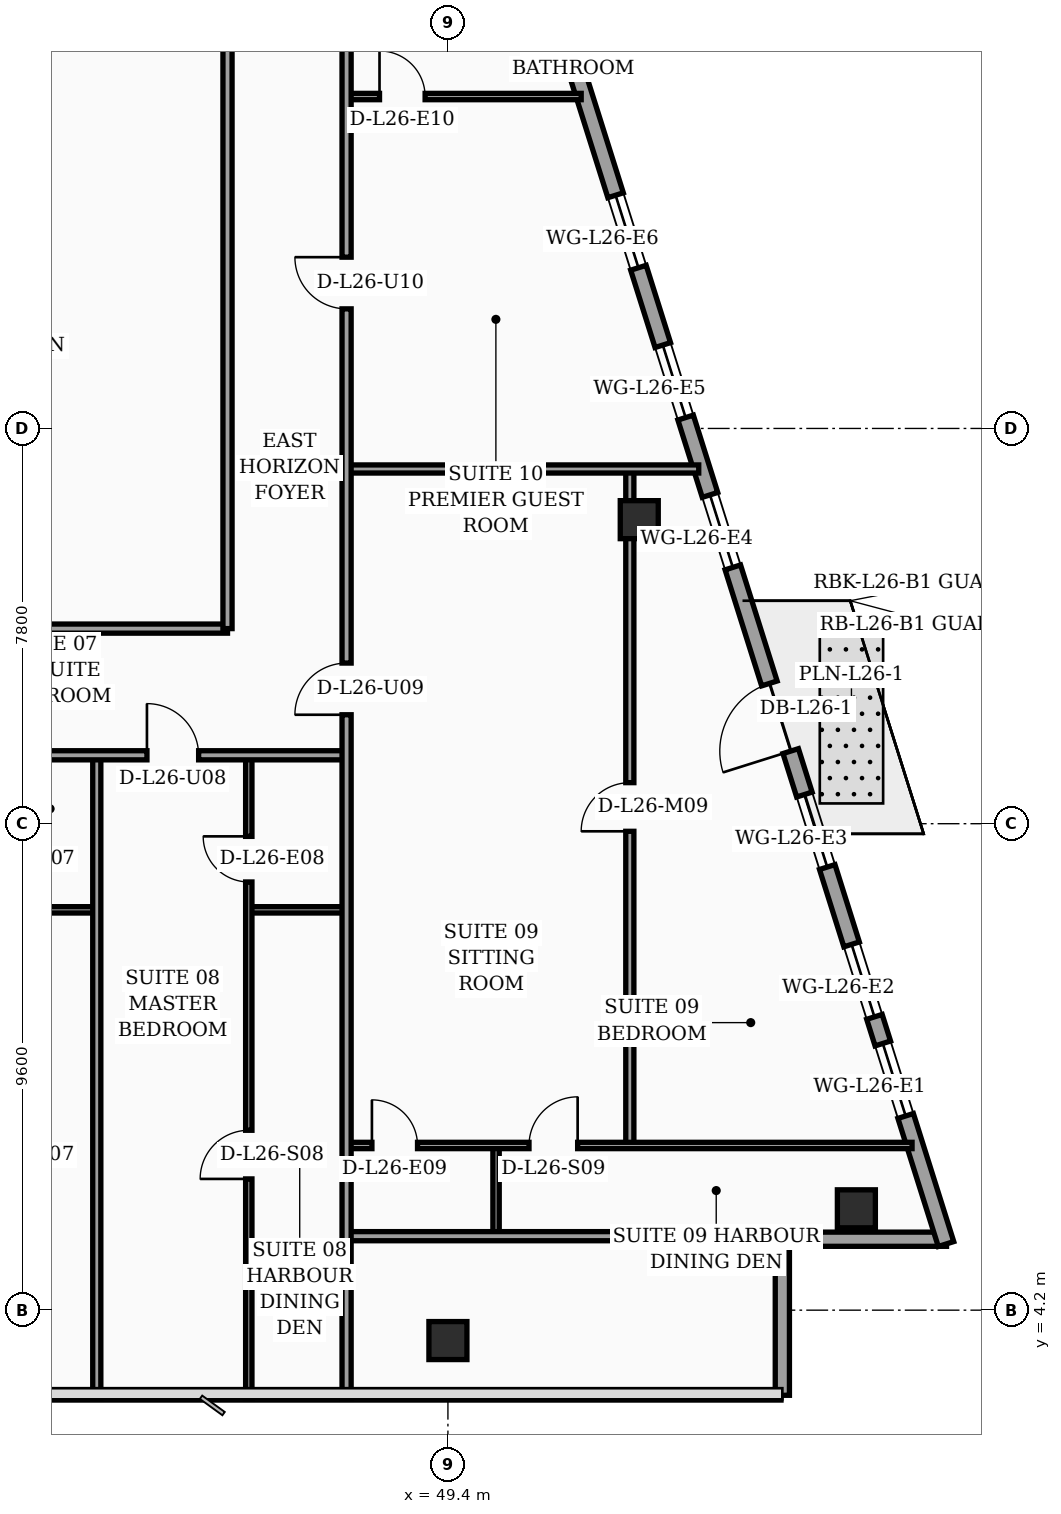
"""IFC4 building model, lengths in metres.
Left out: names, types, materials, properties, quantities, classifications, styles, units other than length and angle.
Written with IfcOpenShell. Run it as: python <this file> out.ifc"""

import sys

from ifc_helpers import new_model, si_unit, direction, frame, frame_2d, origin, origin_2d, place, context, subcontext, project, spatial, rectangle, hollow_rectangle, extrude, element, fill, save


model = new_model("IFC4")
c1 = context("Model", 3, precision=1e-05, world=origin(), true_north=direction((0.0, 1.0)))
c2 = subcontext(c1, "Body", "Model", "MODEL_VIEW")
j1 = project(units=[si_unit("LENGTHUNIT", "METRE"), si_unit("PLANEANGLEUNIT", "RADIAN")], contexts=[c1])
p1 = place(None, origin())
s1 = spatial("IfcSite", under=j1, at=p1, CompositionType="ELEMENT")
p2 = place(p1, origin())
s2 = spatial("IfcBuilding", under=s1, at=p2, CompositionType="ELEMENT")
p3 = place(p2, frame((0.0, 0.0, 108.8)))
s3 = spatial("IfcBuildingStorey", under=s2, at=p3, CompositionType="ELEMENT", Elevation=108.8)
for number, where, z_axis, x_axis in (
    (1, (49.4, 3.6, 0.0), (0.0, 0.0, 1.0), (1.0, 0.0, 0.0)),
    (2, (57.461, 6.2, 0.0), (0.0, 0.0, 1.0), (1.0, 0.0, 0.0)),
    (3, (53.176, 19.8, 0.0), (0.0, 0.0, 1.0), (1.0, 0.0, 0.0)),
):
    element("IfcColumn", number, at=place(p3, frame(where, z_axis=z_axis, x_axis=x_axis)), inside=s3, PredefinedType="COLUMN", context=c2, shape_type="SweptSolid", body=[
        extrude(hollow_rectangle(XDim=0.75, YDim=0.75, WallThickness=0.032, at=origin_2d()), origin(), (0.0, 0.0, 1.0), 3.56),
    ])
p4 = place(p3, frame((56.0, 2.52, 0.0), z_axis=(0.0, 0.0, 1.0), x_axis=(0.0, 1.0, 0.0)))
e4 = element("IfcWall", 4, at=p4, inside=s3, PredefinedType="SOLIDWALL", context=c2, shape_type="SweptSolid", body=[
    extrude(rectangle(XDim=2.94, YDim=0.28, at=frame_2d((1.47, 0.0))), origin(), (0.0, 0.0, 1.0), 3.04),
])
p5 = place(p3, frame((55.86, 5.6, 0.0), z_axis=(0.0, 0.0, 1.0), x_axis=(1.0, 0.0, 0.0)))
e5 = element("IfcWall", 5, at=p5, inside=s3, PredefinedType="SOLIDWALL", context=c2, shape_type="SweptSolid", body=[
    extrude(rectangle(XDim=3.38, YDim=0.28, at=frame_2d((1.69, 0.0))), origin(), (0.0, 0.0, 1.0), 3.04),
])
p6 = place(p3, frame((59.23, 5.505, 0.0), z_axis=(0.0, 0.0, 1.0), x_axis=(-0.300509063924, 0.953778958931, 0.0)))
e6 = element("IfcWall", 6, at=p6, inside=s3, PredefinedType="SOLIDWALL", context=c2, shape_type="SweptSolid", body=[
    extrude(rectangle(XDim=30.814, YDim=0.32, at=frame_2d((15.407, 0.0))), origin(), (0.0, 0.0, 1.0), 3.56),
])
p7 = place(p6, frame((10.199, 0.0, 0.0)))
e7 = element("IfcOpeningElement", 7, at=p7, cuts=e6, PredefinedType="OPENING", context=c2, shape_type="SweptSolid", body=[
    extrude(rectangle(XDim=1.4, YDim=2.25, at=frame_2d((0.7, 1.125))), frame((0.0, 0.17, 0.0), z_axis=(0.0, -1.0, 0.0), x_axis=(1.0, 0.0, 0.0)), (0.0, 0.0, 1.0), 0.34),
])
p8 = place(p6, frame((2.65, 0.0, 0.75)))
e8 = element("IfcOpeningElement", 8, at=p8, cuts=e6, PredefinedType="OPENING", context=c2, shape_type="SweptSolid", body=[
    extrude(rectangle(XDim=1.5, YDim=1.6, at=frame_2d((0.75, 0.8))), frame((0.0, 0.17, 0.0), z_axis=(0.0, -1.0, 0.0), x_axis=(1.0, 0.0, 0.0)), (0.0, 0.0, 1.0), 0.34),
])
p9 = place(p6, frame((4.7, 0.0, 0.75)))
e9 = element("IfcOpeningElement", 9, at=p9, cuts=e6, PredefinedType="OPENING", context=c2, shape_type="SweptSolid", body=[
    extrude(rectangle(XDim=1.5, YDim=1.6, at=frame_2d((0.75, 0.8))), frame((0.0, 0.17, 0.0), z_axis=(0.0, -1.0, 0.0), x_axis=(1.0, 0.0, 0.0)), (0.0, 0.0, 1.0), 0.34),
])
p10 = place(p6, frame((7.8, 0.0, 0.75)))
e10 = element("IfcOpeningElement", 10, at=p10, cuts=e6, PredefinedType="OPENING", context=c2, shape_type="SweptSolid", body=[
    extrude(rectangle(XDim=1.5, YDim=1.6, at=frame_2d((0.75, 0.8))), frame((0.0, 0.17, 0.0), z_axis=(0.0, -1.0, 0.0), x_axis=(1.0, 0.0, 0.0)), (0.0, 0.0, 1.0), 0.34),
])
p11 = place(p6, frame((14.0, 0.0, 0.75)))
e11 = element("IfcOpeningElement", 11, at=p11, cuts=e6, PredefinedType="OPENING", context=c2, shape_type="SweptSolid", body=[
    extrude(rectangle(XDim=1.5, YDim=1.6, at=frame_2d((0.75, 0.8))), frame((0.0, 0.17, 0.0), z_axis=(0.0, -1.0, 0.0), x_axis=(1.0, 0.0, 0.0)), (0.0, 0.0, 1.0), 0.34),
])
p12 = place(p6, frame((17.1, 0.0, 0.75)))
e12 = element("IfcOpeningElement", 12, at=p12, cuts=e6, PredefinedType="OPENING", context=c2, shape_type="SweptSolid", body=[
    extrude(rectangle(XDim=1.5, YDim=1.6, at=frame_2d((0.75, 0.8))), frame((0.0, 0.17, 0.0), z_axis=(0.0, -1.0, 0.0), x_axis=(1.0, 0.0, 0.0)), (0.0, 0.0, 1.0), 0.34),
])
p13 = place(p6, frame((20.2, 0.0, 0.75)))
e13 = element("IfcOpeningElement", 13, at=p13, cuts=e6, PredefinedType="OPENING", context=c2, shape_type="SweptSolid", body=[
    extrude(rectangle(XDim=1.5, YDim=1.6, at=frame_2d((0.75, 0.8))), frame((0.0, 0.17, 0.0), z_axis=(0.0, -1.0, 0.0), x_axis=(1.0, 0.0, 0.0)), (0.0, 0.0, 1.0), 0.34),
])
p14 = place(p6, frame((26.4, 0.0, 0.75)))
e14 = element("IfcOpeningElement", 14, at=p14, cuts=e6, PredefinedType="OPENING", context=c2, shape_type="SweptSolid", body=[
    extrude(rectangle(XDim=1.5, YDim=1.6, at=frame_2d((0.75, 0.8))), frame((0.0, 0.17, 0.0), z_axis=(0.0, -1.0, 0.0), x_axis=(1.0, 0.0, 0.0)), (0.0, 0.0, 1.0), 0.34),
])
p15 = place(p3, frame((40.54, 12.1, 0.0), z_axis=(0.0, 0.0, 1.0), x_axis=(1.0, 0.0, 0.0)))
e15 = element("IfcWall", 15, at=p15, inside=s3, PredefinedType="PARTITIONING", context=c2, shape_type="SweptSolid", body=[
    extrude(rectangle(XDim=1.93, YDim=0.125, at=frame_2d((0.965, 0.0))), origin(), (0.0, 0.0, 1.0), 3.56),
])
p16 = place(p3, frame((45.47, 12.1, 0.0), z_axis=(0.0, 0.0, 1.0), x_axis=(1.0, 0.0, 0.0)))
e16 = element("IfcWall", 16, at=p16, inside=s3, PredefinedType="PARTITIONING", context=c2, shape_type="SweptSolid", body=[
    extrude(rectangle(XDim=1.93, YDim=0.125, at=frame_2d((0.965, 0.0))), origin(), (0.0, 0.0, 1.0), 2.84),
])
p17 = place(p3, frame((45.47, 2.44, 0.0), z_axis=(0.0, 0.0, 1.0), x_axis=(0.0, 1.0, 0.0)))
e17 = element("IfcWall", 17, at=p17, inside=s3, PredefinedType="PARTITIONING", context=c2, shape_type="SweptSolid", body=[
    extrude(rectangle(XDim=12.71, YDim=0.125, at=frame_2d((6.355, 0.0))), origin(), (0.0, 0.0, 1.0), 3.04),
])
p18 = place(p17, frame((4.35, 0.0, 0.0)))
e18 = element("IfcOpeningElement", 18, at=p18, cuts=e17, PredefinedType="OPENING", context=c2, shape_type="SweptSolid", body=[
    extrude(rectangle(XDim=0.96, YDim=2.2, at=frame_2d((0.48, 1.1))), frame((0.0, 0.073, 0.0), z_axis=(0.0, -1.0, 0.0), x_axis=(1.0, 0.0, 0.0)), (0.0, 0.0, 1.0), 0.145),
])
p19 = place(p17, frame((10.21, 0.0, 0.0)))
e19 = element("IfcOpeningElement", 19, at=p19, cuts=e17, PredefinedType="OPENING", context=c2, shape_type="SweptSolid", body=[
    extrude(rectangle(XDim=0.9, YDim=2.15, at=frame_2d((0.45, 1.075))), frame((0.0, 0.073, 0.0), z_axis=(0.0, -1.0, 0.0), x_axis=(1.0, 0.0, 0.0)), (0.0, 0.0, 1.0), 0.145),
])
p20 = place(p3, frame((42.47, 2.44, 0.0), z_axis=(0.0, 0.0, 1.0), x_axis=(0.0, 1.0, 0.0)))
e20 = element("IfcWall", 20, at=p20, inside=s3, PredefinedType="PARTITIONING", context=c2, shape_type="SweptSolid", body=[
    extrude(rectangle(XDim=12.71, YDim=0.16, at=frame_2d((6.355, 0.0))), origin(), (0.0, 0.0, 1.0), 3.04),
])
p21 = place(p3, frame((32.4, 15.15, 0.0), z_axis=(0.0, 0.0, 1.0), x_axis=(1.0, 0.0, 0.0)))
e21 = element("IfcWall", 21, at=p21, inside=s3, PredefinedType="PARTITIONING", context=c2, shape_type="SweptSolid", body=[
    extrude(rectangle(XDim=15.0, YDim=0.18, at=frame_2d((7.5, 0.0))), origin(), (0.0, 0.0, 1.0), 2.84),
])
p22 = place(p21, frame((0.91, 0.0, 0.0)))
e22 = element("IfcOpeningElement", 22, at=p22, cuts=e21, PredefinedType="OPENING", context=c2, shape_type="SweptSolid", body=[
    extrude(rectangle(XDim=1.02, YDim=2.2, at=frame_2d((0.51, 1.1))), frame((0.0, 0.1, 0.0), z_axis=(0.0, -1.0, 0.0), x_axis=(1.0, 0.0, 0.0)), (0.0, 0.0, 1.0), 0.2),
])
p23 = place(p21, frame((5.85, 0.0, 0.0)))
e23 = element("IfcOpeningElement", 23, at=p23, cuts=e21, PredefinedType="OPENING", context=c2, shape_type="SweptSolid", body=[
    extrude(rectangle(XDim=1.02, YDim=2.2, at=frame_2d((0.51, 1.1))), frame((0.0, 0.1, 0.0), z_axis=(0.0, -1.0, 0.0), x_axis=(1.0, 0.0, 0.0)), (0.0, 0.0, 1.0), 0.2),
])
p24 = place(p21, frame((11.06, 0.0, 0.0)))
e24 = element("IfcOpeningElement", 24, at=p24, cuts=e21, PredefinedType="OPENING", context=c2, shape_type="SweptSolid", body=[
    extrude(rectangle(XDim=1.02, YDim=2.2, at=frame_2d((0.51, 1.1))), frame((0.0, 0.1, 0.0), z_axis=(0.0, -1.0, 0.0), x_axis=(1.0, 0.0, 0.0)), (0.0, 0.0, 1.0), 0.2),
])
p25 = place(p3, frame((21.5, 17.65, 0.0), z_axis=(0.0, 0.0, 1.0), x_axis=(1.0, 0.0, 0.0)))
e25 = element("IfcWall", 25, at=p25, inside=s3, PredefinedType="PARTITIONING", context=c2, shape_type="SweptSolid", body=[
    extrude(rectangle(XDim=23.55, YDim=0.18, at=frame_2d((11.775, 0.0))), origin(), (0.0, 0.0, 1.0), 2.84),
])
p26 = place(p25, frame((0.95, 0.0, 0.0)))
e26 = element("IfcOpeningElement", 26, at=p26, cuts=e25, PredefinedType="OPENING", context=c2, shape_type="SweptSolid", body=[
    extrude(rectangle(XDim=1.02, YDim=2.2, at=frame_2d((0.51, 1.1))), frame((0.0, 0.1, 0.0), z_axis=(0.0, -1.0, 0.0), x_axis=(1.0, 0.0, 0.0)), (0.0, 0.0, 1.0), 0.2),
])
p27 = place(p25, frame((12.68, 0.0, 0.0)))
e27 = element("IfcOpeningElement", 27, at=p27, cuts=e25, PredefinedType="OPENING", context=c2, shape_type="SweptSolid", body=[
    extrude(rectangle(XDim=1.02, YDim=2.2, at=frame_2d((0.51, 1.1))), frame((0.0, 0.1, 0.0), z_axis=(0.0, -1.0, 0.0), x_axis=(1.0, 0.0, 0.0)), (0.0, 0.0, 1.0), 0.2),
])
p28 = place(p3, frame((45.05, 17.65, 0.0), z_axis=(0.0, 0.0, 1.0), x_axis=(0.0, 1.0, 0.0)))
e28 = element("IfcWall", 28, at=p28, inside=s3, PredefinedType="PARTITIONING", context=c2, shape_type="SweptSolid", body=[
    extrude(rectangle(XDim=19.9, YDim=0.18, at=frame_2d((9.95, 0.0))), origin(), (0.0, 0.0, 1.0), 2.84),
])
p29 = place(p3, frame((50.35, 5.66, 0.0), z_axis=(0.0, 0.0, 1.0), x_axis=(0.0, 1.0, 0.0)))
e29 = element("IfcWall", 29, at=p29, inside=s3, PredefinedType="PARTITIONING", context=c2, shape_type="SweptSolid", body=[
    extrude(rectangle(XDim=1.79, YDim=0.125, at=frame_2d((0.895, 0.0))), origin(), (0.0, 0.0, 1.0), 3.56),
])
p30 = place(p3, frame((52.99, 7.45, 0.0), z_axis=(0.0, 0.0, 1.0), x_axis=(0.0, 1.0, 0.0)))
e30 = element("IfcWall", 30, at=p30, inside=s3, PredefinedType="PARTITIONING", context=c2, shape_type="SweptSolid", body=[
    extrude(rectangle(XDim=13.35, YDim=0.16, at=frame_2d((6.675, 0.0))), origin(), (0.0, 0.0, 1.0), 2.84),
])
p31 = place(p30, frame((6.2, 0.0, 0.0)))
e31 = element("IfcOpeningElement", 31, at=p31, cuts=e30, PredefinedType="OPENING", context=c2, shape_type="SweptSolid", body=[
    extrude(rectangle(XDim=0.96, YDim=2.2, at=frame_2d((0.48, 1.1))), frame((0.0, 0.09, 0.0), z_axis=(0.0, -1.0, 0.0), x_axis=(1.0, 0.0, 0.0)), (0.0, 0.0, 1.0), 0.18),
])
p32 = place(p3, frame((47.4, 7.45, 0.0), z_axis=(0.0, 0.0, 1.0), x_axis=(1.0, 0.0, 0.0)))
e32 = element("IfcWall", 32, at=p32, inside=s3, PredefinedType="PARTITIONING", context=c2, shape_type="SweptSolid", body=[
    extrude(rectangle(XDim=11.16, YDim=0.125, at=frame_2d((5.58, 0.0))), origin(), (0.0, 0.0, 1.0), 2.84),
])
p33 = place(p32, frame((0.5, 0.0, 0.0)))
e33 = element("IfcOpeningElement", 33, at=p33, cuts=e32, PredefinedType="OPENING", context=c2, shape_type="SweptSolid", body=[
    extrude(rectangle(XDim=0.9, YDim=2.15, at=frame_2d((0.45, 1.075))), frame((0.0, 0.073, 0.0), z_axis=(0.0, -1.0, 0.0), x_axis=(1.0, 0.0, 0.0)), (0.0, 0.0, 1.0), 0.145),
])
p34 = place(p32, frame((3.6, 0.0, 0.0)))
e34 = element("IfcOpeningElement", 34, at=p34, cuts=e32, PredefinedType="OPENING", context=c2, shape_type="SweptSolid", body=[
    extrude(rectangle(XDim=0.96, YDim=2.2, at=frame_2d((0.48, 1.1))), frame((0.0, 0.073, 0.0), z_axis=(0.0, -1.0, 0.0), x_axis=(1.0, 0.0, 0.0)), (0.0, 0.0, 1.0), 0.145),
])
p35 = place(p3, frame((47.4, 5.66, 0.0), z_axis=(0.0, 0.0, 1.0), x_axis=(1.0, 0.0, 0.0)))
e35 = element("IfcWall", 35, at=p35, inside=s3, PredefinedType="PARTITIONING", context=c2, shape_type="SweptSolid", body=[
    extrude(rectangle(XDim=8.6, YDim=0.18, at=frame_2d((4.3, 0.0))), origin(), (0.0, 0.0, 1.0), 2.84),
])
p36 = place(p3, frame((47.4, 28.15, 0.0), z_axis=(0.0, 0.0, 1.0), x_axis=(1.0, 0.0, 0.0)))
e36 = element("IfcWall", 36, at=p36, inside=s3, PredefinedType="PARTITIONING", context=c2, shape_type="SweptSolid", body=[
    extrude(rectangle(XDim=4.63, YDim=0.125, at=frame_2d((2.315, 0.0))), origin(), (0.0, 0.0, 1.0), 3.04),
])
p37 = place(p36, frame((0.65, 0.0, 0.0)))
e37 = element("IfcOpeningElement", 37, at=p37, cuts=e36, PredefinedType="OPENING", context=c2, shape_type="SweptSolid", body=[
    extrude(rectangle(XDim=0.9, YDim=2.15, at=frame_2d((0.45, 1.075))), frame((0.0, 0.073, 0.0), z_axis=(0.0, -1.0, 0.0), x_axis=(1.0, 0.0, 0.0)), (0.0, 0.0, 1.0), 0.145),
])
p38 = place(p3, frame((47.4, 20.8, 0.0), z_axis=(0.0, 0.0, 1.0), x_axis=(1.0, 0.0, 0.0)))
e38 = element("IfcWall", 38, at=p38, inside=s3, PredefinedType="PARTITIONING", context=c2, shape_type="SweptSolid", body=[
    extrude(rectangle(XDim=6.95, YDim=0.16, at=frame_2d((3.475, 0.0))), origin(), (0.0, 0.0, 1.0), 3.04),
])
p39 = place(p3, frame((47.4, 2.44, 0.0), z_axis=(0.0, 0.0, 1.0), x_axis=(0.0, 1.0, 0.0)))
e39 = element("IfcWall", 39, at=p39, inside=s3, PredefinedType="PARTITIONING", context=c2, shape_type="SweptSolid", body=[
    extrude(rectangle(XDim=27.84, YDim=0.18, at=frame_2d((13.92, 0.0))), origin(), (0.0, 0.0, 1.0), 2.84),
])
p40 = place(p39, frame((13.51, 0.0, 0.0)))
e40 = element("IfcOpeningElement", 40, at=p40, cuts=e39, PredefinedType="OPENING", context=c2, shape_type="SweptSolid", body=[
    extrude(rectangle(XDim=1.02, YDim=2.2, at=frame_2d((0.51, 1.1))), frame((0.0, 0.1, 0.0), z_axis=(0.0, -1.0, 0.0), x_axis=(1.0, 0.0, 0.0)), (0.0, 0.0, 1.0), 0.2),
])
p41 = place(p39, frame((21.52, 0.0, 0.0)))
e41 = element("IfcOpeningElement", 41, at=p41, cuts=e39, PredefinedType="OPENING", context=c2, shape_type="SweptSolid", body=[
    extrude(rectangle(XDim=1.02, YDim=2.2, at=frame_2d((0.51, 1.1))), frame((0.0, 0.1, 0.0), z_axis=(0.0, -1.0, 0.0), x_axis=(1.0, 0.0, 0.0)), (0.0, 0.0, 1.0), 0.2),
])
p42 = place(p7, origin())
e42 = element("IfcDoor", 42, at=p42, inside=s3, OperationType="SINGLE_SWING_LEFT", PredefinedType="DOOR", context=c2, shape_type="SweptSolid", body=[
    extrude(rectangle(XDim=1.4, YDim=2.25, at=frame_2d((0.7, 1.125))), frame((0.0, 0.025, 0.0), z_axis=(0.0, -1.0, 0.0), x_axis=(1.0, 0.0, 0.0)), (0.0, 0.0, 1.0), 0.05),
])
fill(e7, e42)
p43 = place(p8, origin())
e43 = element("IfcWindow", 43, at=p43, inside=s3, PartitioningType="SINGLE_PANEL", PredefinedType="WINDOW", context=c2, shape_type="SweptSolid", body=[
    extrude(rectangle(XDim=1.5, YDim=1.6, at=frame_2d((0.75, 0.8))), frame((0.0, 0.03, 0.0), z_axis=(0.0, -1.0, 0.0), x_axis=(1.0, 0.0, 0.0)), (0.0, 0.0, 1.0), 0.06),
])
fill(e8, e43)
p44 = place(p9, origin())
e44 = element("IfcWindow", 44, at=p44, inside=s3, PartitioningType="SINGLE_PANEL", PredefinedType="WINDOW", context=c2, shape_type="SweptSolid", body=[
    extrude(rectangle(XDim=1.5, YDim=1.6, at=frame_2d((0.75, 0.8))), frame((0.0, 0.03, 0.0), z_axis=(0.0, -1.0, 0.0), x_axis=(1.0, 0.0, 0.0)), (0.0, 0.0, 1.0), 0.06),
])
fill(e9, e44)
p45 = place(p10, origin())
e45 = element("IfcWindow", 45, at=p45, inside=s3, PartitioningType="SINGLE_PANEL", PredefinedType="WINDOW", context=c2, shape_type="SweptSolid", body=[
    extrude(rectangle(XDim=1.5, YDim=1.6, at=frame_2d((0.75, 0.8))), frame((0.0, 0.03, 0.0), z_axis=(0.0, -1.0, 0.0), x_axis=(1.0, 0.0, 0.0)), (0.0, 0.0, 1.0), 0.06),
])
fill(e10, e45)
p46 = place(p11, origin())
e46 = element("IfcWindow", 46, at=p46, inside=s3, PartitioningType="SINGLE_PANEL", PredefinedType="WINDOW", context=c2, shape_type="SweptSolid", body=[
    extrude(rectangle(XDim=1.5, YDim=1.6, at=frame_2d((0.75, 0.8))), frame((0.0, 0.03, 0.0), z_axis=(0.0, -1.0, 0.0), x_axis=(1.0, 0.0, 0.0)), (0.0, 0.0, 1.0), 0.06),
])
fill(e11, e46)
p47 = place(p12, origin())
e47 = element("IfcWindow", 47, at=p47, inside=s3, PartitioningType="SINGLE_PANEL", PredefinedType="WINDOW", context=c2, shape_type="SweptSolid", body=[
    extrude(rectangle(XDim=1.5, YDim=1.6, at=frame_2d((0.75, 0.8))), frame((0.0, 0.03, 0.0), z_axis=(0.0, -1.0, 0.0), x_axis=(1.0, 0.0, 0.0)), (0.0, 0.0, 1.0), 0.06),
])
fill(e12, e47)
p48 = place(p13, origin())
e48 = element("IfcWindow", 48, at=p48, inside=s3, PartitioningType="SINGLE_PANEL", PredefinedType="WINDOW", context=c2, shape_type="SweptSolid", body=[
    extrude(rectangle(XDim=1.5, YDim=1.6, at=frame_2d((0.75, 0.8))), frame((0.0, 0.03, 0.0), z_axis=(0.0, -1.0, 0.0), x_axis=(1.0, 0.0, 0.0)), (0.0, 0.0, 1.0), 0.06),
])
fill(e13, e48)
p49 = place(p18, origin())
e49 = element("IfcDoor", 49, at=p49, inside=s3, OperationType="SINGLE_SWING_LEFT", PredefinedType="DOOR", context=c2, shape_type="SweptSolid", body=[
    extrude(rectangle(XDim=0.96, YDim=2.2, at=frame_2d((0.48, 1.1))), frame((0.0, 0.025, 0.0), z_axis=(0.0, -1.0, 0.0), x_axis=(1.0, 0.0, 0.0)), (0.0, 0.0, 1.0), 0.05),
])
fill(e18, e49)
p50 = place(p19, origin())
e50 = element("IfcDoor", 50, at=p50, inside=s3, OperationType="SINGLE_SWING_RIGHT", PredefinedType="DOOR", context=c2, shape_type="SweptSolid", body=[
    extrude(rectangle(XDim=0.9, YDim=2.15, at=frame_2d((0.45, 1.075))), frame((0.0, 0.025, 0.0), z_axis=(0.0, -1.0, 0.0), x_axis=(1.0, 0.0, 0.0)), (0.0, 0.0, 1.0), 0.05),
])
fill(e19, e50)
p51 = place(p24, origin())
e51 = element("IfcDoor", 51, at=p51, inside=s3, OperationType="SINGLE_SWING_LEFT", PredefinedType="DOOR", context=c2, shape_type="SweptSolid", body=[
    extrude(rectangle(XDim=1.02, YDim=2.2, at=frame_2d((0.51, 1.1))), frame((0.0, 0.025, 0.0), z_axis=(0.0, -1.0, 0.0), x_axis=(1.0, 0.0, 0.0)), (0.0, 0.0, 1.0), 0.05),
])
fill(e24, e51)
p52 = place(p31, origin())
e52 = element("IfcDoor", 52, at=p52, inside=s3, OperationType="SINGLE_SWING_LEFT", PredefinedType="DOOR", context=c2, shape_type="SweptSolid", body=[
    extrude(rectangle(XDim=0.96, YDim=2.2, at=frame_2d((0.48, 1.1))), frame((0.0, 0.025, 0.0), z_axis=(0.0, -1.0, 0.0), x_axis=(1.0, 0.0, 0.0)), (0.0, 0.0, 1.0), 0.05),
])
fill(e31, e52)
p53 = place(p33, origin())
e53 = element("IfcDoor", 53, at=p53, inside=s3, OperationType="SINGLE_SWING_LEFT", PredefinedType="DOOR", context=c2, shape_type="SweptSolid", body=[
    extrude(rectangle(XDim=0.9, YDim=2.15, at=frame_2d((0.45, 1.075))), frame((0.0, 0.025, 0.0), z_axis=(0.0, -1.0, 0.0), x_axis=(1.0, 0.0, 0.0)), (0.0, 0.0, 1.0), 0.05),
])
fill(e33, e53)
p54 = place(p34, origin())
e54 = element("IfcDoor", 54, at=p54, inside=s3, OperationType="SINGLE_SWING_RIGHT", PredefinedType="DOOR", context=c2, shape_type="SweptSolid", body=[
    extrude(rectangle(XDim=0.96, YDim=2.2, at=frame_2d((0.48, 1.1))), frame((0.0, 0.025, 0.0), z_axis=(0.0, -1.0, 0.0), x_axis=(1.0, 0.0, 0.0)), (0.0, 0.0, 1.0), 0.05),
])
fill(e34, e54)
p55 = place(p37, origin())
e55 = element("IfcDoor", 55, at=p55, inside=s3, OperationType="SINGLE_SWING_LEFT", PredefinedType="DOOR", context=c2, shape_type="SweptSolid", body=[
    extrude(rectangle(XDim=0.9, YDim=2.15, at=frame_2d((0.45, 1.075))), frame((0.0, 0.025, 0.0), z_axis=(0.0, -1.0, 0.0), x_axis=(1.0, 0.0, 0.0)), (0.0, 0.0, 1.0), 0.05),
])
fill(e37, e55)
p56 = place(p40, origin())
e56 = element("IfcDoor", 56, at=p56, inside=s3, OperationType="SINGLE_SWING_LEFT", PredefinedType="DOOR", context=c2, shape_type="SweptSolid", body=[
    extrude(rectangle(XDim=1.02, YDim=2.2, at=frame_2d((0.51, 1.1))), frame((0.0, 0.025, 0.0), z_axis=(0.0, -1.0, 0.0), x_axis=(1.0, 0.0, 0.0)), (0.0, 0.0, 1.0), 0.05),
])
fill(e40, e56)
p57 = place(p41, origin())
e57 = element("IfcDoor", 57, at=p57, inside=s3, OperationType="SINGLE_SWING_RIGHT", PredefinedType="DOOR", context=c2, shape_type="SweptSolid", body=[
    extrude(rectangle(XDim=1.02, YDim=2.2, at=frame_2d((0.51, 1.1))), frame((0.0, 0.025, 0.0), z_axis=(0.0, -1.0, 0.0), x_axis=(1.0, 0.0, 0.0)), (0.0, 0.0, 1.0), 0.05),
])
fill(e41, e57)
save(model, sys.argv[1])
